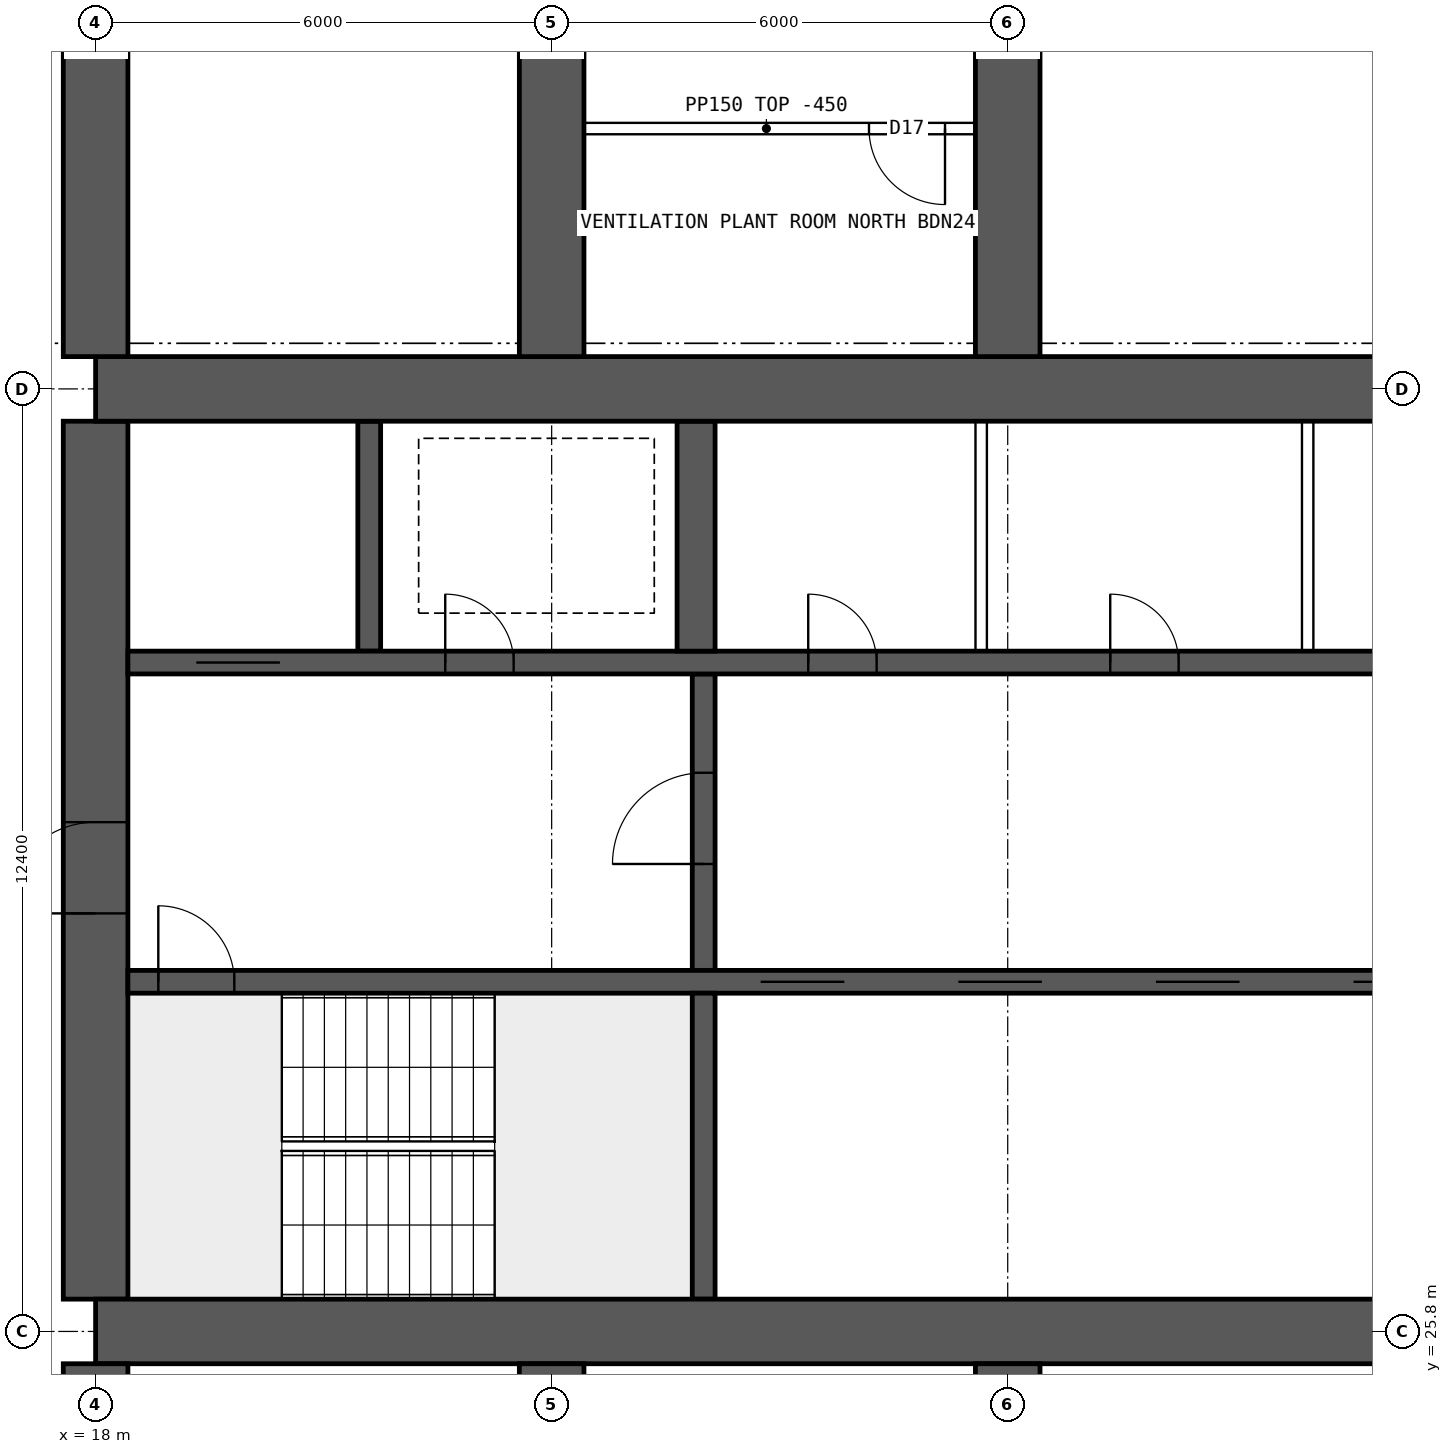
"""IFC4 building model, lengths in metres.
Left out: names, types, materials, properties, quantities, classifications, styles, units other than length and angle.
Written with IfcOpenShell. Run it as: python <this file> out.ifc"""

import sys

from ifc_helpers import new_model, si_unit, direction, frame, frame_2d, origin, place, context, subcontext, project, spatial, rectangle, extrude, element, fill, save


model = new_model("IFC4")
c1 = context("Model", 3, precision=1e-05, world=origin(), true_north=direction((0.0, 1.0)))
c2 = subcontext(c1, "Body", "Model", "MODEL_VIEW")
j1 = project(units=[si_unit("LENGTHUNIT", "METRE"), si_unit("PLANEANGLEUNIT", "RADIAN")], contexts=[c1])
p1 = place(None, origin())
s1 = spatial("IfcSite", under=j1, at=p1, CompositionType="ELEMENT")
p2 = place(p1, origin())
s2 = spatial("IfcBuilding", under=s1, at=p2, CompositionType="ELEMENT")
p3 = place(p2, frame((0.0, 0.0, 144.85)))
s3 = spatial("IfcBuildingStorey", under=s2, at=p3, CompositionType="ELEMENT", Elevation=144.85)
for number, where, z_axis, x_axis in (
    (1, (18.0, 25.8, 0.0), (0.0, 0.0, 1.0), (1.0, 0.0, 0.0)),
    (2, (18.0, 38.2, 0.0), (0.0, 0.0, 1.0), (1.0, 0.0, 0.0)),
):
    element("IfcWall", number, at=place(p3, frame(where, z_axis=z_axis, x_axis=x_axis)), inside=s3, PredefinedType="SHEAR", context=c2, shape_type="SweptSolid", body=[
        extrude(rectangle(XDim=48.0, YDim=0.85, at=frame_2d((24.0, 0.0))), origin(), (0.0, 0.0, 1.0), 3.75),
    ])
p4 = place(p3, frame((18.0, 26.225, 0.0), z_axis=(0.0, 0.0, 1.0), x_axis=(0.0, 1.0, 0.0)))
e3 = element("IfcWall", 3, at=p4, inside=s3, PredefinedType="SHEAR", context=c2, shape_type="SweptSolid", body=[
    extrude(rectangle(XDim=11.55, YDim=0.85, at=frame_2d((5.775, 0.0))), origin(), (0.0, 0.0, 1.0), 3.75),
])
p5 = place(p4, frame((5.075, 0.0, 0.0)))
e4 = element("IfcOpeningElement", 4, at=p5, cuts=e3, PredefinedType="OPENING", context=c2, shape_type="SweptSolid", body=[
    extrude(rectangle(XDim=1.2, YDim=2.1, at=frame_2d((0.6, 1.05))), frame((0.0, 0.435, 0.0), z_axis=(0.0, -1.0, 0.0), x_axis=(1.0, 0.0, 0.0)), (0.0, 0.0, 1.0), 0.87),
])
p6 = place(p3, frame((18.425, 30.4, 0.0), z_axis=(0.0, 0.0, 1.0), x_axis=(1.0, 0.0, 0.0)))
e5 = element("IfcWall", 5, at=p6, inside=s3, PredefinedType="SHEAR", context=c2, shape_type="SweptSolid", body=[
    extrude(rectangle(XDim=47.15, YDim=0.3, at=frame_2d((23.575, 0.0))), origin(), (0.0, 0.0, 1.0), 3.75),
])
p7 = place(p6, frame((0.4, 0.0, 0.0)))
e6 = element("IfcOpeningElement", 6, at=p7, cuts=e5, PredefinedType="OPENING", context=c2, shape_type="SweptSolid", body=[
    extrude(rectangle(XDim=1.0, YDim=2.1, at=frame_2d((0.5, 1.05))), frame((0.0, 0.16, 0.0), z_axis=(0.0, -1.0, 0.0), x_axis=(1.0, 0.0, 0.0)), (0.0, 0.0, 1.0), 0.32),
])
p8 = place(p6, frame((45.75, 0.0, 0.0)))
e7 = element("IfcOpeningElement", 7, at=p8, cuts=e5, PredefinedType="OPENING", context=c2, shape_type="SweptSolid", body=[
    extrude(rectangle(XDim=1.0, YDim=2.1, at=frame_2d((0.5, 1.05))), frame((0.0, 0.16, 0.0), z_axis=(0.0, -1.0, 0.0), x_axis=(1.0, 0.0, 0.0)), (0.0, 0.0, 1.0), 0.32),
])
p9 = place(p6, frame((8.325, 0.0, 0.0)))
e8 = element("IfcOpeningElement", 8, at=p9, cuts=e5, PredefinedType="OPENING", context=c2, shape_type="SweptSolid", body=[
    extrude(rectangle(XDim=1.1, YDim=2.1, at=frame_2d((0.55, 1.05))), frame((0.0, 0.16, 0.0), z_axis=(0.0, -1.0, 0.0), x_axis=(1.0, 0.0, 0.0)), (0.0, 0.0, 1.0), 0.32),
])
p10 = place(p6, frame((10.925, 0.0, 0.0)))
e9 = element("IfcOpeningElement", 9, at=p10, cuts=e5, PredefinedType="OPENING", context=c2, shape_type="SweptSolid", body=[
    extrude(rectangle(XDim=1.1, YDim=2.1, at=frame_2d((0.55, 1.05))), frame((0.0, 0.16, 0.0), z_axis=(0.0, -1.0, 0.0), x_axis=(1.0, 0.0, 0.0)), (0.0, 0.0, 1.0), 0.32),
])
p11 = place(p6, frame((13.525, 0.0, 0.0)))
e10 = element("IfcOpeningElement", 10, at=p11, cuts=e5, PredefinedType="OPENING", context=c2, shape_type="SweptSolid", body=[
    extrude(rectangle(XDim=1.1, YDim=2.1, at=frame_2d((0.55, 1.05))), frame((0.0, 0.16, 0.0), z_axis=(0.0, -1.0, 0.0), x_axis=(1.0, 0.0, 0.0)), (0.0, 0.0, 1.0), 0.32),
])
p12 = place(p6, frame((16.125, 0.0, 0.0)))
e11 = element("IfcOpeningElement", 11, at=p12, cuts=e5, PredefinedType="OPENING", context=c2, shape_type="SweptSolid", body=[
    extrude(rectangle(XDim=1.1, YDim=2.1, at=frame_2d((0.55, 1.05))), frame((0.0, 0.16, 0.0), z_axis=(0.0, -1.0, 0.0), x_axis=(1.0, 0.0, 0.0)), (0.0, 0.0, 1.0), 0.32),
])
p13 = place(p6, frame((18.9, 0.0, 0.0)))
e12 = element("IfcOpeningElement", 12, at=p13, cuts=e5, PredefinedType="OPENING", context=c2, shape_type="SweptSolid", body=[
    extrude(rectangle(XDim=0.9, YDim=2.1, at=frame_2d((0.45, 1.05))), frame((0.0, 0.16, 0.0), z_axis=(0.0, -1.0, 0.0), x_axis=(1.0, 0.0, 0.0)), (0.0, 0.0, 1.0), 0.32),
])
p14 = place(p6, frame((30.192, 0.0, 0.0)))
e13 = element("IfcOpeningElement", 13, at=p14, cuts=e5, PredefinedType="OPENING", context=c2, shape_type="SweptSolid", body=[
    extrude(rectangle(XDim=1.1, YDim=2.1, at=frame_2d((0.55, 1.05))), frame((0.0, 0.16, 0.0), z_axis=(0.0, -1.0, 0.0), x_axis=(1.0, 0.0, 0.0)), (0.0, 0.0, 1.0), 0.32),
])
p15 = place(p6, frame((33.725, 0.0, 0.0)))
e14 = element("IfcOpeningElement", 14, at=p15, cuts=e5, PredefinedType="OPENING", context=c2, shape_type="SweptSolid", body=[
    extrude(rectangle(XDim=1.1, YDim=2.1, at=frame_2d((0.55, 1.05))), frame((0.0, 0.16, 0.0), z_axis=(0.0, -1.0, 0.0), x_axis=(1.0, 0.0, 0.0)), (0.0, 0.0, 1.0), 0.32),
])
p16 = place(p6, frame((37.258, 0.0, 0.0)))
e15 = element("IfcOpeningElement", 15, at=p16, cuts=e5, PredefinedType="OPENING", context=c2, shape_type="SweptSolid", body=[
    extrude(rectangle(XDim=1.1, YDim=2.1, at=frame_2d((0.55, 1.05))), frame((0.0, 0.16, 0.0), z_axis=(0.0, -1.0, 0.0), x_axis=(1.0, 0.0, 0.0)), (0.0, 0.0, 1.0), 0.32),
])
p17 = place(p3, frame((18.425, 34.6, 0.0), z_axis=(0.0, 0.0, 1.0), x_axis=(1.0, 0.0, 0.0)))
e16 = element("IfcWall", 16, at=p17, inside=s3, PredefinedType="SHEAR", context=c2, shape_type="SweptSolid", body=[
    extrude(rectangle(XDim=47.15, YDim=0.3, at=frame_2d((23.575, 0.0))), origin(), (0.0, 0.0, 1.0), 3.75),
])
p18 = place(p17, frame((0.9, 0.0, 0.0)))
e17 = element("IfcOpeningElement", 17, at=p18, cuts=e16, PredefinedType="OPENING", context=c2, shape_type="SweptSolid", body=[
    extrude(rectangle(XDim=1.1, YDim=2.1, at=frame_2d((0.55, 1.05))), frame((0.0, 0.16, 0.0), z_axis=(0.0, -1.0, 0.0), x_axis=(1.0, 0.0, 0.0)), (0.0, 0.0, 1.0), 0.32),
])
p19 = place(p17, frame((45.15, 0.0, 0.0)))
e18 = element("IfcOpeningElement", 18, at=p19, cuts=e16, PredefinedType="OPENING", context=c2, shape_type="SweptSolid", body=[
    extrude(rectangle(XDim=1.1, YDim=2.1, at=frame_2d((0.55, 1.05))), frame((0.0, 0.16, 0.0), z_axis=(0.0, -1.0, 0.0), x_axis=(1.0, 0.0, 0.0)), (0.0, 0.0, 1.0), 0.32),
])
p20 = place(p17, frame((4.175, 0.0, 0.0)))
e19 = element("IfcOpeningElement", 19, at=p20, cuts=e16, PredefinedType="OPENING", context=c2, shape_type="SweptSolid", body=[
    extrude(rectangle(XDim=0.9, YDim=2.1, at=frame_2d((0.45, 1.05))), frame((0.0, 0.16, 0.0), z_axis=(0.0, -1.0, 0.0), x_axis=(1.0, 0.0, 0.0)), (0.0, 0.0, 1.0), 0.32),
])
p21 = place(p17, frame((42.075, 0.0, 0.0)))
e20 = element("IfcOpeningElement", 20, at=p21, cuts=e16, PredefinedType="OPENING", context=c2, shape_type="SweptSolid", body=[
    extrude(rectangle(XDim=0.9, YDim=2.1, at=frame_2d((0.45, 1.05))), frame((0.0, 0.16, 0.0), z_axis=(0.0, -1.0, 0.0), x_axis=(1.0, 0.0, 0.0)), (0.0, 0.0, 1.0), 0.32),
])
p22 = place(p17, frame((8.95, 0.0, 0.0)))
e21 = element("IfcOpeningElement", 21, at=p22, cuts=e16, PredefinedType="OPENING", context=c2, shape_type="SweptSolid", body=[
    extrude(rectangle(XDim=0.9, YDim=2.1, at=frame_2d((0.45, 1.05))), frame((0.0, 0.16, 0.0), z_axis=(0.0, -1.0, 0.0), x_axis=(1.0, 0.0, 0.0)), (0.0, 0.0, 1.0), 0.32),
])
p23 = place(p17, frame((12.924, 0.0, 0.0)))
e22 = element("IfcOpeningElement", 22, at=p23, cuts=e16, PredefinedType="OPENING", context=c2, shape_type="SweptSolid", body=[
    extrude(rectangle(XDim=0.9, YDim=2.1, at=frame_2d((0.45, 1.05))), frame((0.0, 0.16, 0.0), z_axis=(0.0, -1.0, 0.0), x_axis=(1.0, 0.0, 0.0)), (0.0, 0.0, 1.0), 0.32),
])
p24 = place(p17, frame((16.571, 0.0, 0.0)))
e23 = element("IfcOpeningElement", 23, at=p24, cuts=e16, PredefinedType="OPENING", context=c2, shape_type="SweptSolid", body=[
    extrude(rectangle(XDim=0.9, YDim=2.1, at=frame_2d((0.45, 1.05))), frame((0.0, 0.16, 0.0), z_axis=(0.0, -1.0, 0.0), x_axis=(1.0, 0.0, 0.0)), (0.0, 0.0, 1.0), 0.32),
])
p25 = place(p17, frame((20.33, 0.0, 0.0)))
e24 = element("IfcOpeningElement", 24, at=p25, cuts=e16, PredefinedType="OPENING", context=c2, shape_type="SweptSolid", body=[
    extrude(rectangle(XDim=0.9, YDim=2.1, at=frame_2d((0.45, 1.05))), frame((0.0, 0.16, 0.0), z_axis=(0.0, -1.0, 0.0), x_axis=(1.0, 0.0, 0.0)), (0.0, 0.0, 1.0), 0.32),
])
p26 = place(p17, frame((24.736, 0.0, 0.0)))
e25 = element("IfcOpeningElement", 25, at=p26, cuts=e16, PredefinedType="OPENING", context=c2, shape_type="SweptSolid", body=[
    extrude(rectangle(XDim=0.9, YDim=2.1, at=frame_2d((0.45, 1.05))), frame((0.0, 0.16, 0.0), z_axis=(0.0, -1.0, 0.0), x_axis=(1.0, 0.0, 0.0)), (0.0, 0.0, 1.0), 0.32),
])
p27 = place(p17, frame((27.533, 0.0, 0.0)))
e26 = element("IfcOpeningElement", 26, at=p27, cuts=e16, PredefinedType="OPENING", context=c2, shape_type="SweptSolid", body=[
    extrude(rectangle(XDim=0.9, YDim=2.1, at=frame_2d((0.45, 1.05))), frame((0.0, 0.16, 0.0), z_axis=(0.0, -1.0, 0.0), x_axis=(1.0, 0.0, 0.0)), (0.0, 0.0, 1.0), 0.32),
])
p28 = place(p17, frame((30.716, 0.0, 0.0)))
e27 = element("IfcOpeningElement", 27, at=p28, cuts=e16, PredefinedType="OPENING", context=c2, shape_type="SweptSolid", body=[
    extrude(rectangle(XDim=0.9, YDim=2.1, at=frame_2d((0.45, 1.05))), frame((0.0, 0.16, 0.0), z_axis=(0.0, -1.0, 0.0), x_axis=(1.0, 0.0, 0.0)), (0.0, 0.0, 1.0), 0.32),
])
p29 = place(p17, frame((34.667, 0.0, 0.0)))
e28 = element("IfcOpeningElement", 28, at=p29, cuts=e16, PredefinedType="OPENING", context=c2, shape_type="SweptSolid", body=[
    extrude(rectangle(XDim=0.9, YDim=2.1, at=frame_2d((0.45, 1.05))), frame((0.0, 0.16, 0.0), z_axis=(0.0, -1.0, 0.0), x_axis=(1.0, 0.0, 0.0)), (0.0, 0.0, 1.0), 0.32),
])
p30 = place(p17, frame((37.605, 0.0, 0.0)))
e29 = element("IfcOpeningElement", 29, at=p30, cuts=e16, PredefinedType="OPENING", context=c2, shape_type="SweptSolid", body=[
    extrude(rectangle(XDim=0.9, YDim=2.1, at=frame_2d((0.45, 1.05))), frame((0.0, 0.16, 0.0), z_axis=(0.0, -1.0, 0.0), x_axis=(1.0, 0.0, 0.0)), (0.0, 0.0, 1.0), 0.32),
])
p31 = place(p3, frame((26.0, 26.225, 0.0), z_axis=(0.0, 0.0, 1.0), x_axis=(0.0, 1.0, 0.0)))
e30 = element("IfcWall", 30, at=p31, inside=s3, PredefinedType="SHEAR", context=c2, shape_type="SweptSolid", body=[
    extrude(rectangle(XDim=4.025, YDim=0.3, at=frame_2d((2.012, 0.0))), origin(), (0.0, 0.0, 1.0), 3.75),
])
p32 = place(p3, frame((26.0, 30.55, 0.0), z_axis=(0.0, 0.0, 1.0), x_axis=(0.0, 1.0, 0.0)))
e31 = element("IfcWall", 31, at=p32, inside=s3, PredefinedType="SHEAR", context=c2, shape_type="SweptSolid", body=[
    extrude(rectangle(XDim=3.9, YDim=0.3, at=frame_2d((1.95, 0.0))), origin(), (0.0, 0.0, 1.0), 3.75),
])
p33 = place(p32, frame((1.4, 0.0, 0.0)))
e32 = element("IfcOpeningElement", 32, at=p33, cuts=e31, PredefinedType="OPENING", context=c2, shape_type="SweptSolid", body=[
    extrude(rectangle(XDim=1.2, YDim=2.1, at=frame_2d((0.6, 1.05))), frame((0.0, 0.16, 0.0), z_axis=(0.0, -1.0, 0.0), x_axis=(1.0, 0.0, 0.0)), (0.0, 0.0, 1.0), 0.32),
])
p34 = place(p3, frame((21.6, 34.75, 0.0), z_axis=(0.0, 0.0, 1.0), x_axis=(0.0, 1.0, 0.0)))
e33 = element("IfcWall", 33, at=p34, inside=s3, PredefinedType="SHEAR", context=c2, shape_type="SweptSolid", body=[
    extrude(rectangle(XDim=3.025, YDim=0.3, at=frame_2d((1.512, 0.0))), origin(), (0.0, 0.0, 1.0), 3.75),
])
p35 = place(p3, frame((25.9, 34.75, 0.0), z_axis=(0.0, 0.0, 1.0), x_axis=(0.0, 1.0, 0.0)))
e34 = element("IfcWall", 34, at=p35, inside=s3, PredefinedType="SHEAR", context=c2, shape_type="SweptSolid", body=[
    extrude(rectangle(XDim=3.025, YDim=0.5, at=frame_2d((1.512, 0.0))), origin(), (0.0, 0.0, 1.0), 3.75),
])
for number, where, z_axis, x_axis in (
    (35, (18.0, 17.2, 0.0), (0.0, 0.0, 1.0), (0.0, 1.0, 0.0)),
    (36, (18.0, 38.625, 0.0), (0.0, 0.0, 1.0), (0.0, 1.0, 0.0)),
    (37, (24.0, 17.2, 0.0), (0.0, 0.0, 1.0), (0.0, 1.0, 0.0)),
    (38, (24.0, 38.625, 0.0), (0.0, 0.0, 1.0), (0.0, 1.0, 0.0)),
    (39, (30.0, 17.2, 0.0), (0.0, 0.0, 1.0), (0.0, 1.0, 0.0)),
    (40, (30.0, 38.625, 0.0), (0.0, 0.0, 1.0), (0.0, 1.0, 0.0)),
):
    element("IfcWall", number, at=place(p3, frame(where, z_axis=z_axis, x_axis=x_axis)), inside=s3, PredefinedType="SHEAR", context=c2, shape_type="SweptSolid", body=[
        extrude(rectangle(XDim=8.175, YDim=0.85, at=frame_2d((4.087, 0.0))), origin(), (0.0, 0.0, 1.0), 3.75),
    ])
for number, where, z_axis, x_axis in (
    (41, (29.651, 34.75, 0.0), (0.0, 0.0, 1.0), (0.0, 1.0, 0.0)),
    (42, (33.946, 34.75, 0.0), (0.0, 0.0, 1.0), (0.0, 1.0, 0.0)),
):
    element("IfcWall", number, at=place(p3, frame(where, z_axis=z_axis, x_axis=x_axis)), inside=s3, PredefinedType="SOLIDWALL", context=c2, shape_type="SweptSolid", body=[
        extrude(rectangle(XDim=3.025, YDim=0.15, at=frame_2d((1.512, 0.0))), origin(), (0.0, 0.0, 1.0), 3.3),
    ])
p36 = place(p3, frame((29.575, 41.625, 0.0), z_axis=(0.0, 0.0, 1.0), x_axis=(-1.0, 0.0, 0.0)))
e43 = element("IfcWall", 43, at=p36, inside=s3, PredefinedType="PARTITIONING", context=c2, shape_type="SweptSolid", body=[
    extrude(rectangle(XDim=5.5, YDim=0.15, at=frame_2d((2.75, 0.0))), origin(), (0.0, 0.0, 1.0), 3.3),
])
p37 = place(p36, frame((0.4, 0.0, 0.0)))
e44 = element("IfcOpeningElement", 44, at=p37, cuts=e43, PredefinedType="OPENING", context=c2, shape_type="SweptSolid", body=[
    extrude(rectangle(XDim=1.0, YDim=2.1, at=frame_2d((0.5, 1.05))), frame((0.0, 0.085, 0.0), z_axis=(0.0, -1.0, 0.0), x_axis=(1.0, 0.0, 0.0)), (0.0, 0.0, 1.0), 0.17),
])
p38 = place(p5, origin())
e45 = element("IfcDoor", 45, at=p38, inside=s3, OperationType="SINGLE_SWING_LEFT", PredefinedType="DOOR", context=c2, shape_type="SweptSolid", body=[
    extrude(rectangle(XDim=1.2, YDim=2.1, at=frame_2d((0.6, 1.05))), frame((0.0, 0.025, 0.0), z_axis=(0.0, -1.0, 0.0), x_axis=(1.0, 0.0, 0.0)), (0.0, 0.0, 1.0), 0.05),
])
fill(e4, e45)
p39 = place(p7, origin())
e46 = element("IfcDoor", 46, at=p39, inside=s3, OperationType="SINGLE_SWING_LEFT", PredefinedType="DOOR", context=c2, shape_type="SweptSolid", body=[
    extrude(rectangle(XDim=1.0, YDim=2.1, at=frame_2d((0.5, 1.05))), frame((0.0, 0.025, 0.0), z_axis=(0.0, -1.0, 0.0), x_axis=(1.0, 0.0, 0.0)), (0.0, 0.0, 1.0), 0.05),
])
fill(e6, e46)
p40 = place(p18, origin())
e47 = element("IfcDoor", 47, at=p40, inside=s3, OperationType="DOUBLE_DOOR_SLIDING", PredefinedType="DOOR", context=c2, shape_type="SweptSolid", body=[
    extrude(rectangle(XDim=1.1, YDim=2.1, at=frame_2d((0.55, 1.05))), frame((0.0, 0.025, 0.0), z_axis=(0.0, -1.0, 0.0), x_axis=(1.0, 0.0, 0.0)), (0.0, 0.0, 1.0), 0.05),
])
fill(e17, e47)
p41 = place(p20, origin())
e48 = element("IfcDoor", 48, at=p41, inside=s3, OperationType="SINGLE_SWING_LEFT", PredefinedType="DOOR", context=c2, shape_type="SweptSolid", body=[
    extrude(rectangle(XDim=0.9, YDim=2.1, at=frame_2d((0.45, 1.05))), frame((0.0, 0.025, 0.0), z_axis=(0.0, -1.0, 0.0), x_axis=(1.0, 0.0, 0.0)), (0.0, 0.0, 1.0), 0.05),
])
fill(e19, e48)
p42 = place(p33, origin())
e49 = element("IfcDoor", 49, at=p42, inside=s3, OperationType="SINGLE_SWING_LEFT", PredefinedType="DOOR", context=c2, shape_type="SweptSolid", body=[
    extrude(rectangle(XDim=1.2, YDim=2.1, at=frame_2d((0.6, 1.05))), frame((0.0, 0.025, 0.0), z_axis=(0.0, -1.0, 0.0), x_axis=(1.0, 0.0, 0.0)), (0.0, 0.0, 1.0), 0.05),
])
fill(e32, e49)
p43 = place(p22, origin())
e50 = element("IfcDoor", 50, at=p43, inside=s3, OperationType="SINGLE_SWING_LEFT", PredefinedType="DOOR", context=c2, shape_type="SweptSolid", body=[
    extrude(rectangle(XDim=0.9, YDim=2.1, at=frame_2d((0.45, 1.05))), frame((0.0, 0.025, 0.0), z_axis=(0.0, -1.0, 0.0), x_axis=(1.0, 0.0, 0.0)), (0.0, 0.0, 1.0), 0.05),
])
fill(e21, e50)
p44 = place(p23, origin())
e51 = element("IfcDoor", 51, at=p44, inside=s3, OperationType="SINGLE_SWING_LEFT", PredefinedType="DOOR", context=c2, shape_type="SweptSolid", body=[
    extrude(rectangle(XDim=0.9, YDim=2.1, at=frame_2d((0.45, 1.05))), frame((0.0, 0.025, 0.0), z_axis=(0.0, -1.0, 0.0), x_axis=(1.0, 0.0, 0.0)), (0.0, 0.0, 1.0), 0.05),
])
fill(e22, e51)
p45 = place(p9, origin())
e52 = element("IfcDoor", 52, at=p45, inside=s3, OperationType="DOUBLE_DOOR_SLIDING", PredefinedType="DOOR", context=c2, shape_type="SweptSolid", body=[
    extrude(rectangle(XDim=1.1, YDim=2.1, at=frame_2d((0.55, 1.05))), frame((0.0, 0.025, 0.0), z_axis=(0.0, -1.0, 0.0), x_axis=(1.0, 0.0, 0.0)), (0.0, 0.0, 1.0), 0.05),
])
fill(e8, e52)
p46 = place(p10, origin())
e53 = element("IfcDoor", 53, at=p46, inside=s3, OperationType="DOUBLE_DOOR_SLIDING", PredefinedType="DOOR", context=c2, shape_type="SweptSolid", body=[
    extrude(rectangle(XDim=1.1, YDim=2.1, at=frame_2d((0.55, 1.05))), frame((0.0, 0.025, 0.0), z_axis=(0.0, -1.0, 0.0), x_axis=(1.0, 0.0, 0.0)), (0.0, 0.0, 1.0), 0.05),
])
fill(e9, e53)
p47 = place(p11, origin())
e54 = element("IfcDoor", 54, at=p47, inside=s3, OperationType="DOUBLE_DOOR_SLIDING", PredefinedType="DOOR", context=c2, shape_type="SweptSolid", body=[
    extrude(rectangle(XDim=1.1, YDim=2.1, at=frame_2d((0.55, 1.05))), frame((0.0, 0.025, 0.0), z_axis=(0.0, -1.0, 0.0), x_axis=(1.0, 0.0, 0.0)), (0.0, 0.0, 1.0), 0.05),
])
fill(e10, e54)
p48 = place(p12, origin())
e55 = element("IfcDoor", 55, at=p48, inside=s3, OperationType="DOUBLE_DOOR_SLIDING", PredefinedType="DOOR", context=c2, shape_type="SweptSolid", body=[
    extrude(rectangle(XDim=1.1, YDim=2.1, at=frame_2d((0.55, 1.05))), frame((0.0, 0.025, 0.0), z_axis=(0.0, -1.0, 0.0), x_axis=(1.0, 0.0, 0.0)), (0.0, 0.0, 1.0), 0.05),
])
fill(e11, e55)
p49 = place(p37, origin())
e56 = element("IfcDoor", 56, at=p49, inside=s3, OperationType="SINGLE_SWING_LEFT", PredefinedType="DOOR", context=c2, shape_type="SweptSolid", body=[
    extrude(rectangle(XDim=1.0, YDim=2.1, at=frame_2d((0.5, 1.05))), frame((0.0, 0.025, 0.0), z_axis=(0.0, -1.0, 0.0), x_axis=(1.0, 0.0, 0.0)), (0.0, 0.0, 1.0), 0.05),
])
fill(e44, e56)
save(model, sys.argv[1])
